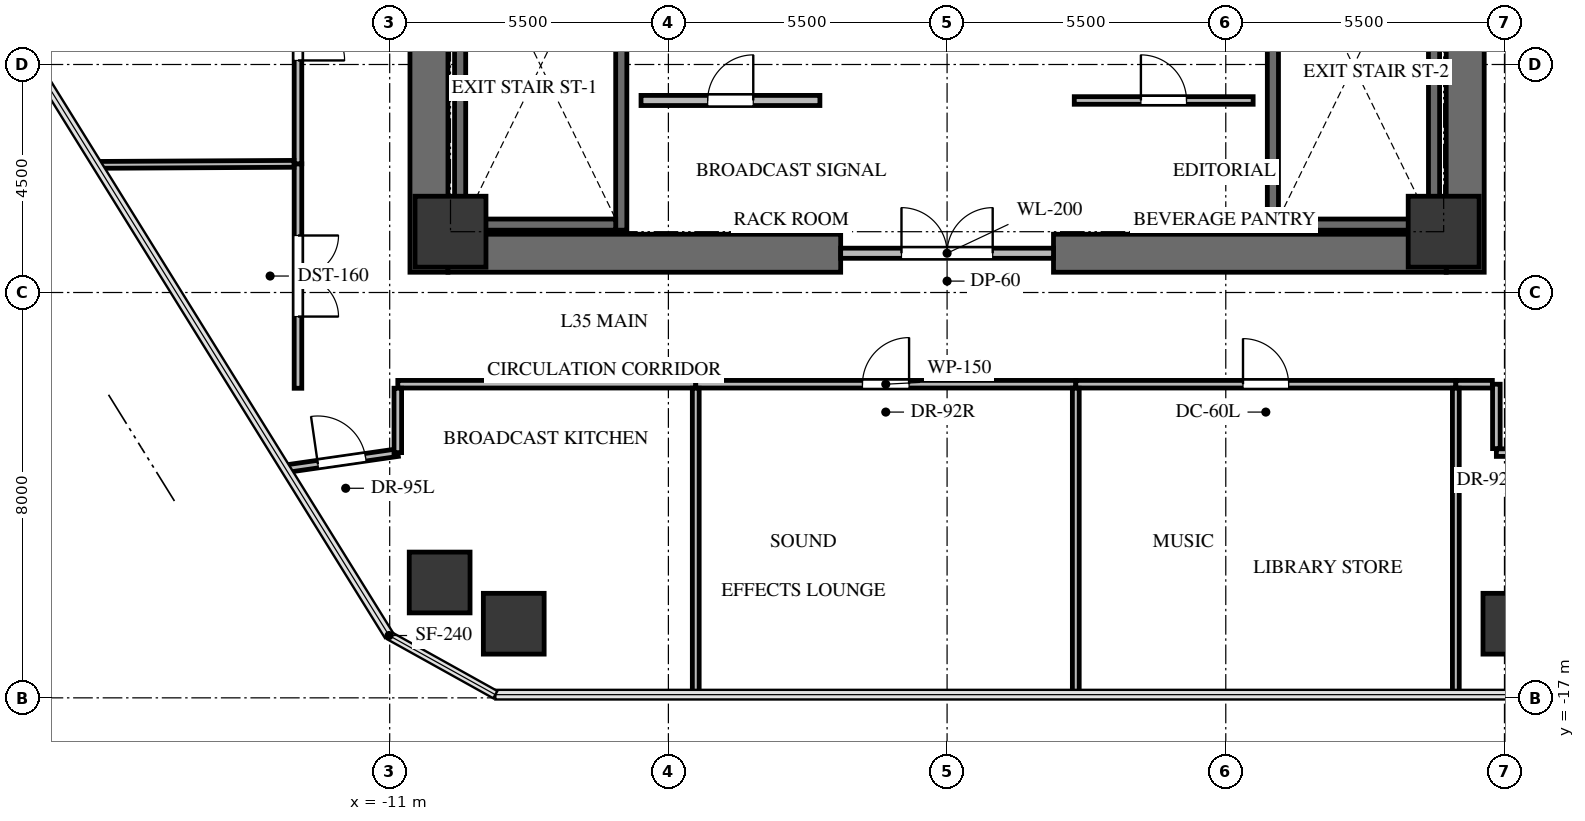
"""IFC4 building model, lengths in metres.
Left out: names, types, materials, properties, quantities, classifications, styles, units other than length and angle.
Written with IfcOpenShell. Run it as: python <this file> out.ifc"""

import sys

from ifc_helpers import new_model, si_unit, direction, frame, frame_2d, origin, origin_2d, place, context, subcontext, project, spatial, rectangle, extrude, source, transform, mapped, element, fill, save


model = new_model("IFC4")
c1 = context("Model", 3, precision=1e-05, world=origin(), true_north=direction((0.0, 1.0)))
c2 = subcontext(c1, "Body", "Model", "MODEL_VIEW")
j1 = project(units=[si_unit("LENGTHUNIT", "METRE"), si_unit("PLANEANGLEUNIT", "RADIAN")], contexts=[c1])
p1 = place(None, origin())
s1 = spatial("IfcSite", under=j1, at=p1, CompositionType="ELEMENT")
p2 = place(p1, origin())
s2 = spatial("IfcBuilding", under=s1, at=p2, CompositionType="ELEMENT")
p3 = place(p2, frame((0.0, 0.0, 130.5)))
s3 = spatial("IfcBuildingStorey", under=s2, at=p3, CompositionType="ELEMENT", Elevation=130.5)
for number, where, z_axis, x_axis in (
    (1, (-10.225, -8.6, 0.0), (0.0, 0.0, 1.0), (0.0, 1.0, 0.0)),
    (2, (10.225, -8.6, 0.0), (0.0, 0.0, 1.0), (0.0, 1.0, 0.0)),
):
    element("IfcWall", number, at=place(p3, frame(where, z_axis=z_axis, x_axis=x_axis)), inside=s3, PredefinedType="SHEAR", context=c2, shape_type="SweptSolid", body=[
        extrude(rectangle(XDim=17.2, YDim=0.75, at=frame_2d((8.6, 0.0))), origin(), (0.0, 0.0, 1.0), 3.3),
    ])
for number, where, z_axis, x_axis in (
    (3, (-9.85, -8.225, 0.0), (0.0, 0.0, 1.0), (1.0, 0.0, 0.0)),
    (4, (2.1, -8.225, 0.0), (0.0, 0.0, 1.0), (1.0, 0.0, 0.0)),
):
    element("IfcWall", number, at=place(p3, frame(where, z_axis=z_axis, x_axis=x_axis)), inside=s3, PredefinedType="SHEAR", context=c2, shape_type="SweptSolid", body=[
        extrude(rectangle(XDim=7.75, YDim=0.75, at=frame_2d((3.875, 0.0))), origin(), (0.0, 0.0, 1.0), 3.3),
    ])
p4 = place(p3, frame((-6.43, -7.77, -0.24), z_axis=(0.0, 0.0, 1.0), x_axis=(0.0, 1.0, 0.0)))
e5 = element("IfcWall", 5, at=p4, inside=s3, PredefinedType="SHEAR", context=c2, shape_type="SweptSolid", body=[
    extrude(rectangle(XDim=7.89, YDim=0.22, at=frame_2d((3.945, 0.0))), origin(), (0.0, 0.0, 1.0), 3.3),
])
p5 = place(p4, frame((6.32, 0.0, 0.0)))
e6 = element("IfcOpeningElement", 6, at=p5, cuts=e5, PredefinedType="OPENING", context=c2, shape_type="SweptSolid", body=[
    extrude(rectangle(XDim=1.05, YDim=2.15, at=frame_2d((0.525, 1.075))), frame((0.0, 0.12, 0.0), z_axis=(0.0, -1.0, 0.0), x_axis=(1.0, 0.0, 0.0)), (0.0, 0.0, 1.0), 0.24),
])
p6 = place(p3, frame((-9.61, 0.12, -0.24), z_axis=(0.0, 0.0, 1.0), x_axis=(0.0, -1.0, 0.0)))
e7 = element("IfcWall", 7, at=p6, inside=s3, PredefinedType="SHEAR", context=c2, shape_type="SweptSolid", body=[
    extrude(rectangle(XDim=7.89, YDim=0.22, at=frame_2d((3.945, 0.0))), origin(), (0.0, 0.0, 1.0), 3.3),
])
p7 = place(p3, frame((-9.5, -7.66, -0.24), z_axis=(0.0, 0.0, 1.0), x_axis=(1.0, 0.0, 0.0)))
e8 = element("IfcWall", 8, at=p7, inside=s3, PredefinedType="SHEAR", context=c2, shape_type="SweptSolid", body=[
    extrude(rectangle(XDim=2.96, YDim=0.22, at=frame_2d((1.48, 0.0))), origin(), (0.0, 0.0, 1.0), 3.3),
])
p8 = place(p3, frame((9.61, -7.77, -0.24), z_axis=(0.0, 0.0, 1.0), x_axis=(0.0, 1.0, 0.0)))
e9 = element("IfcWall", 9, at=p8, inside=s3, PredefinedType="SHEAR", context=c2, shape_type="SweptSolid", body=[
    extrude(rectangle(XDim=7.89, YDim=0.22, at=frame_2d((3.945, 0.0))), origin(), (0.0, 0.0, 1.0), 3.3),
])
p9 = place(p3, frame((6.43, 0.12, -0.24), z_axis=(0.0, 0.0, 1.0), x_axis=(0.0, -1.0, 0.0)))
e10 = element("IfcWall", 10, at=p9, inside=s3, PredefinedType="SHEAR", context=c2, shape_type="SweptSolid", body=[
    extrude(rectangle(XDim=7.89, YDim=0.22, at=frame_2d((3.945, 0.0))), origin(), (0.0, 0.0, 1.0), 3.3),
])
p10 = place(p9, frame((0.52, 0.0, 0.0)))
e11 = element("IfcOpeningElement", 11, at=p10, cuts=e10, PredefinedType="OPENING", context=c2, shape_type="SweptSolid", body=[
    extrude(rectangle(XDim=1.05, YDim=2.15, at=frame_2d((0.525, 1.075))), frame((0.0, 0.12, 0.0), z_axis=(0.0, -1.0, 0.0), x_axis=(1.0, 0.0, 0.0)), (0.0, 0.0, 1.0), 0.24),
])
p11 = place(p3, frame((6.54, -7.66, -0.24), z_axis=(0.0, 0.0, 1.0), x_axis=(1.0, 0.0, 0.0)))
e12 = element("IfcWall", 12, at=p11, inside=s3, PredefinedType="SHEAR", context=c2, shape_type="SweptSolid", body=[
    extrude(rectangle(XDim=2.96, YDim=0.22, at=frame_2d((1.48, 0.0))), origin(), (0.0, 0.0, 1.0), 3.3),
])
m1 = source(origin(), c2, "Body", "SweptSolid", [
    extrude(rectangle(XDim=1.4, YDim=1.4, at=origin_2d()), origin(), (0.0, 0.0, 1.0), 3.3),
])
for number, where, z_axis, x_axis in (
    (13, (-9.8, -7.8, -0.24), (0.0, 0.0, 1.0), (1.0, 0.0, 0.0)),
    (14, (9.8, -7.8, -0.24), (0.0, 0.0, 1.0), (1.0, 0.0, 0.0)),
):
    element("IfcColumn", number, at=place(p3, frame(where, z_axis=z_axis, x_axis=x_axis)), inside=s3, PredefinedType="COLUMN", context=c2, shape_type="MappedRepresentation", body=[
        mapped(m1, transform((0.0, 0.0, 0.0), x_axis=(1.0, 0.0, 0.0), y_axis=(0.0, 1.0, 0.0), z_axis=(0.0, 0.0, 1.0), scale=1.0)),
    ])
m2 = source(origin(), c2, "Body", "SweptSolid", [
    extrude(rectangle(XDim=1.2, YDim=1.2, at=origin_2d()), origin(), (0.0, 0.0, 1.0), 3.3),
])
for number, where, z_axis, x_axis in (
    (15, (-10.014, -14.723, -0.24), (0.0, 0.0, 1.0), (1.0, 0.0, 0.0)),
    (16, (11.176, -15.537, -0.24), (0.0, 0.0, 1.0), (1.0, 0.0, 0.0)),
    (17, (-8.552, -15.537, -0.24), (0.0, 0.0, 1.0), (1.0, 0.0, 0.0)),
):
    element("IfcColumn", number, at=place(p3, frame(where, z_axis=z_axis, x_axis=x_axis)), inside=s3, PredefinedType="COLUMN", context=c2, shape_type="MappedRepresentation", body=[
        mapped(m2, transform((0.0, 0.0, 0.0), x_axis=(1.0, 0.0, 0.0), y_axis=(0.0, 1.0, 0.0), z_axis=(0.0, 0.0, 1.0), scale=1.0)),
    ])
p12 = place(p3, frame((-2.1, -8.225, 0.0), z_axis=(0.0, 0.0, 1.0), x_axis=(1.0, 0.0, 0.0)))
e18 = element("IfcWall", 18, at=p12, inside=s3, PredefinedType="SOLIDWALL", context=c2, shape_type="SweptSolid", body=[
    extrude(rectangle(XDim=4.2, YDim=0.2, at=frame_2d((2.1, 0.0))), origin(), (0.0, 0.0, 1.0), 3.045),
])
p13 = place(p12, frame((1.2, 0.0, 0.0)))
e19 = element("IfcOpeningElement", 19, at=p13, cuts=e18, PredefinedType="OPENING", context=c2, shape_type="SweptSolid", body=[
    extrude(rectangle(XDim=1.8, YDim=2.15, at=frame_2d((0.9, 1.075))), frame((0.0, 0.11, 0.0), z_axis=(0.0, -1.0, 0.0), x_axis=(1.0, 0.0, 0.0)), (0.0, 0.0, 1.0), 0.22),
])
p14 = place(p3, frame((-6.04, -5.21, 0.0), z_axis=(0.0, 0.0, 1.0), x_axis=(1.0, 0.0, 0.0)))
e20 = element("IfcWall", 20, at=p14, inside=s3, PredefinedType="SOLIDWALL", context=c2, shape_type="SweptSolid", body=[
    extrude(rectangle(XDim=3.53, YDim=0.2, at=frame_2d((1.765, 0.0))), origin(), (0.0, 0.0, 1.0), 3.045),
])
p15 = place(p14, frame((1.315, 0.0, 0.0)))
e21 = element("IfcOpeningElement", 21, at=p15, cuts=e20, PredefinedType="OPENING", context=c2, shape_type="SweptSolid", body=[
    extrude(rectangle(XDim=0.9, YDim=2.05, at=frame_2d((0.45, 1.025))), frame((0.0, 0.11, 0.0), z_axis=(0.0, -1.0, 0.0), x_axis=(1.0, 0.0, 0.0)), (0.0, 0.0, 1.0), 0.22),
])
p16 = place(p3, frame((2.51, -5.21, 0.0), z_axis=(0.0, 0.0, 1.0), x_axis=(1.0, 0.0, 0.0)))
e22 = element("IfcWall", 22, at=p16, inside=s3, PredefinedType="PARTITIONING", context=c2, shape_type="SweptSolid", body=[
    extrude(rectangle(XDim=3.53, YDim=0.15, at=frame_2d((1.765, 0.0))), origin(), (0.0, 0.0, 1.0), 3.045),
])
p17 = place(p16, frame((1.315, 0.0, 0.0)))
e23 = element("IfcOpeningElement", 23, at=p17, cuts=e22, PredefinedType="OPENING", context=c2, shape_type="SweptSolid", body=[
    extrude(rectangle(XDim=0.9, YDim=2.05, at=frame_2d((0.45, 1.025))), frame((0.0, 0.085, 0.0), z_axis=(0.0, -1.0, 0.0), x_axis=(1.0, 0.0, 0.0)), (0.0, 0.0, 1.0), 0.17),
])
p18 = place(p3, frame((-10.84, -10.81, 0.0), z_axis=(0.0, 0.0, 1.0), x_axis=(1.0, 0.0, 0.0)))
e24 = element("IfcWall", 24, at=p18, inside=s3, PredefinedType="PARTITIONING", context=c2, shape_type="SweptSolid", body=[
    extrude(rectangle(XDim=5.88, YDim=0.15, at=frame_2d((2.94, 0.0))), origin(), (0.0, 0.0, 1.0), 2.212),
])
p19 = place(p3, frame((-13.054, -12.479, 0.0), z_axis=(0.0, 0.0, 1.0), x_axis=(0.989787303338, 0.142552075227, 0.0)))
e25 = element("IfcWall", 25, at=p19, inside=s3, PredefinedType="PARTITIONING", context=c2, shape_type="SweptSolid", body=[
    extrude(rectangle(XDim=2.237, YDim=0.15, at=frame_2d((1.118, 0.0))), origin(), (0.0, 0.0, 1.0), 2.38),
])
p20 = place(p19, frame((0.643, 0.0, 0.0)))
e26 = element("IfcOpeningElement", 26, at=p20, cuts=e25, PredefinedType="OPENING", context=c2, shape_type="SweptSolid", body=[
    extrude(rectangle(XDim=0.95, YDim=2.1, at=frame_2d((0.475, 1.05))), frame((0.0, 0.085, 0.0), z_axis=(0.0, -1.0, 0.0), x_axis=(1.0, 0.0, 0.0)), (0.0, 0.0, 1.0), 0.17),
])
p21 = place(p3, frame((-10.84, -12.16, 0.0), z_axis=(0.0, 0.0, 1.0), x_axis=(0.0, 1.0, 0.0)))
e27 = element("IfcWall", 27, at=p21, inside=s3, PredefinedType="PARTITIONING", context=c2, shape_type="SweptSolid", body=[
    extrude(rectangle(XDim=1.271, YDim=0.15, at=frame_2d((0.635, 0.0))), origin(), (0.0, 0.0, 1.0), 3.045),
])
p22 = place(p3, frame((-4.96, -10.81, 0.0), z_axis=(0.0, 0.0, 1.0), x_axis=(1.0, 0.0, 0.0)))
e28 = element("IfcWall", 28, at=p22, inside=s3, PredefinedType="PARTITIONING", context=c2, shape_type="SweptSolid", body=[
    extrude(rectangle(XDim=7.5, YDim=0.15, at=frame_2d((3.75, 0.0))), origin(), (0.0, 0.0, 1.0), 2.212),
])
p23 = place(p22, frame((3.29, 0.0, 0.0)))
e29 = element("IfcOpeningElement", 29, at=p23, cuts=e28, PredefinedType="OPENING", context=c2, shape_type="SweptSolid", body=[
    extrude(rectangle(XDim=0.92, YDim=2.1, at=frame_2d((0.46, 1.05))), frame((0.0, 0.085, 0.0), z_axis=(0.0, -1.0, 0.0), x_axis=(1.0, 0.0, 0.0)), (0.0, 0.0, 1.0), 0.17),
])
p24 = place(p3, frame((2.54, -10.81, 0.0), z_axis=(0.0, 0.0, 1.0), x_axis=(1.0, 0.0, 0.0)))
e30 = element("IfcWall", 30, at=p24, inside=s3, PredefinedType="PARTITIONING", context=c2, shape_type="SweptSolid", body=[
    extrude(rectangle(XDim=7.5, YDim=0.15, at=frame_2d((3.75, 0.0))), origin(), (0.0, 0.0, 1.0), 2.212),
])
p25 = place(p24, frame((3.3, 0.0, 0.0)))
e31 = element("IfcOpeningElement", 31, at=p25, cuts=e30, PredefinedType="OPENING", context=c2, shape_type="SweptSolid", body=[
    extrude(rectangle(XDim=0.9, YDim=2.05, at=frame_2d((0.45, 1.025))), frame((0.0, 0.085, 0.0), z_axis=(0.0, -1.0, 0.0), x_axis=(1.0, 0.0, 0.0)), (0.0, 0.0, 1.0), 0.17),
])
p26 = place(p3, frame((10.84, -12.16, 0.0), z_axis=(0.0, 0.0, 1.0), x_axis=(1.0, 0.0, 0.0)))
e32 = element("IfcWall", 32, at=p26, inside=s3, PredefinedType="PARTITIONING", context=c2, shape_type="SweptSolid", body=[
    extrude(rectangle(XDim=1.97, YDim=0.15, at=frame_2d((0.985, 0.0))), origin(), (0.0, 0.0, 1.0), 3.045),
])
p27 = place(p26, frame((0.525, 0.0, 0.0)))
e33 = element("IfcOpeningElement", 33, at=p27, cuts=e32, PredefinedType="OPENING", context=c2, shape_type="SweptSolid", body=[
    extrude(rectangle(XDim=0.92, YDim=2.1, at=frame_2d((0.46, 1.05))), frame((0.0, 0.085, 0.0), z_axis=(0.0, -1.0, 0.0), x_axis=(1.0, 0.0, 0.0)), (0.0, 0.0, 1.0), 0.17),
])
p28 = place(p3, frame((10.84, -10.81, 0.0), z_axis=(0.0, 0.0, 1.0), x_axis=(0.0, -1.0, 0.0)))
e34 = element("IfcWall", 34, at=p28, inside=s3, PredefinedType="PARTITIONING", context=c2, shape_type="SweptSolid", body=[
    extrude(rectangle(XDim=1.271, YDim=0.15, at=frame_2d((0.635, 0.0))), origin(), (0.0, 0.0, 1.0), 3.045),
])
p29 = place(p3, frame((10.04, -10.81, 0.0), z_axis=(0.0, 0.0, 1.0), x_axis=(1.0, 0.0, 0.0)))
e35 = element("IfcWall", 35, at=p29, inside=s3, PredefinedType="PARTITIONING", context=c2, shape_type="SweptSolid", body=[
    extrude(rectangle(XDim=0.721, YDim=0.15, at=frame_2d((0.36, 0.0))), origin(), (0.0, 0.0, 1.0), 3.045),
])
p30 = place(p3, frame((-12.81, -6.46, 0.0), z_axis=(0.0, 0.0, 1.0), x_axis=(0.0, -1.0, 0.0)))
e36 = element("IfcWall", 36, at=p30, inside=s3, PredefinedType="PARTITIONING", context=c2, shape_type="SweptSolid", body=[
    extrude(rectangle(XDim=4.43, YDim=0.15, at=frame_2d((2.215, 0.0))), origin(), (0.0, 0.0, 1.0), 2.38),
])
p31 = place(p30, frame((1.415, 0.0, 0.0)))
e37 = element("IfcOpeningElement", 37, at=p31, cuts=e36, PredefinedType="OPENING", context=c2, shape_type="SweptSolid", body=[
    extrude(rectangle(XDim=1.6, YDim=2.15, at=frame_2d((0.8, 1.075))), frame((0.0, 0.085, 0.0), z_axis=(0.0, -1.0, 0.0), x_axis=(1.0, 0.0, 0.0)), (0.0, 0.0, 1.0), 0.17),
])
p32 = place(p3, frame((-12.81, -1.46, 0.0), z_axis=(0.0, 0.0, 1.0), x_axis=(0.0, -1.0, 0.0)))
e38 = element("IfcWall", 38, at=p32, inside=s3, PredefinedType="PARTITIONING", context=c2, shape_type="SweptSolid", body=[
    extrude(rectangle(XDim=5.0, YDim=0.15, at=frame_2d((2.5, 0.0))), origin(), (0.0, 0.0, 1.0), 3.045),
])
p33 = place(p32, frame((2.04, 0.0, 0.0)))
e39 = element("IfcOpeningElement", 39, at=p33, cuts=e38, PredefinedType="OPENING", context=c2, shape_type="SweptSolid", body=[
    extrude(rectangle(XDim=0.92, YDim=2.1, at=frame_2d((0.46, 1.05))), frame((0.0, 0.085, 0.0), z_axis=(0.0, -1.0, 0.0), x_axis=(1.0, 0.0, 0.0)), (0.0, 0.0, 1.0), 0.17),
])
p34 = place(p3, frame((-4.96, -10.889, 0.0), z_axis=(0.0, 0.0, 1.0), x_axis=(0.0, -1.0, 0.0)))
e40 = element("IfcWall", 40, at=p34, inside=s3, PredefinedType="PARTITIONING", context=c2, shape_type="SweptSolid", body=[
    extrude(rectangle(XDim=6.048, YDim=0.135, at=frame_2d((3.024, 0.0))), origin(), (0.0, 0.0, 1.0), 2.212),
])
p35 = place(p3, frame((2.54, -10.889, 0.0), z_axis=(0.0, 0.0, 1.0), x_axis=(0.0, -1.0, 0.0)))
e41 = element("IfcWall", 41, at=p35, inside=s3, PredefinedType="PARTITIONING", context=c2, shape_type="SweptSolid", body=[
    extrude(rectangle(XDim=6.048, YDim=0.135, at=frame_2d((3.024, 0.0))), origin(), (0.0, 0.0, 1.0), 2.38),
])
p36 = place(p3, frame((10.04, -10.889, 0.0), z_axis=(0.0, 0.0, 1.0), x_axis=(0.0, -1.0, 0.0)))
e42 = element("IfcWall", 42, at=p36, inside=s3, PredefinedType="PARTITIONING", context=c2, shape_type="SweptSolid", body=[
    extrude(rectangle(XDim=6.048, YDim=0.135, at=frame_2d((3.024, 0.0))), origin(), (0.0, 0.0, 1.0), 2.212),
])
p37 = place(p3, frame((-16.774, -6.481, 0.0), z_axis=(0.0, 0.0, 1.0), x_axis=(0.999985736048, 0.005341132812, 0.0)))
e43 = element("IfcWall", 43, at=p37, inside=s3, PredefinedType="PARTITIONING", context=c2, shape_type="SweptSolid", body=[
    extrude(rectangle(XDim=3.885, YDim=0.135, at=frame_2d((1.943, 0.0))), origin(), (0.0, 0.0, 1.0), 2.38),
])
m3 = source(origin(), c2, "Body", "SweptSolid", [
    extrude(rectangle(XDim=1.8, YDim=2.15, at=frame_2d((0.9, 1.075))), frame((0.0, 0.025, 0.0), z_axis=(0.0, -1.0, 0.0), x_axis=(1.0, 0.0, 0.0)), (0.0, 0.0, 1.0), 0.05),
])
p38 = place(p13, origin())
e44 = element("IfcDoor", 44, at=p38, inside=s3, OperationType="DOUBLE_DOOR_SINGLE_SWING", PredefinedType="DOOR", context=c2, shape_type="MappedRepresentation", body=[
    mapped(m3, transform((0.0, 0.0, 0.0), x_axis=(1.0, 0.0, 0.0), y_axis=(0.0, 1.0, 0.0), z_axis=(0.0, 0.0, 1.0), scale=1.0)),
])
fill(e19, e44)
m4 = source(origin(), c2, "Body", "SweptSolid", [
    extrude(rectangle(XDim=0.9, YDim=2.05, at=frame_2d((0.45, 1.025))), frame((0.0, 0.025, 0.0), z_axis=(0.0, -1.0, 0.0), x_axis=(1.0, 0.0, 0.0)), (0.0, 0.0, 1.0), 0.05),
])
p39 = place(p15, origin())
e45 = element("IfcDoor", 45, at=p39, inside=s3, OperationType="SINGLE_SWING_RIGHT", PredefinedType="DOOR", context=c2, shape_type="MappedRepresentation", body=[
    mapped(m4, transform((0.0, 0.0, 0.0), x_axis=(1.0, 0.0, 0.0), y_axis=(0.0, 1.0, 0.0), z_axis=(0.0, 0.0, 1.0), scale=1.0)),
])
fill(e21, e45)
m5 = source(origin(), c2, "Body", "SweptSolid", [
    extrude(rectangle(XDim=0.9, YDim=2.05, at=frame_2d((0.45, 1.025))), frame((0.0, 0.025, 0.0), z_axis=(0.0, -1.0, 0.0), x_axis=(1.0, 0.0, 0.0)), (0.0, 0.0, 1.0), 0.05),
])
p40 = place(p17, origin())
e46 = element("IfcDoor", 46, at=p40, inside=s3, OperationType="SINGLE_SWING_LEFT", PredefinedType="DOOR", context=c2, shape_type="MappedRepresentation", body=[
    mapped(m5, transform((0.0, 0.0, 0.0), x_axis=(1.0, 0.0, 0.0), y_axis=(0.0, 1.0, 0.0), z_axis=(0.0, 0.0, 1.0), scale=1.0)),
])
fill(e23, e46)
m6 = source(origin(), c2, "Body", "SweptSolid", [
    extrude(rectangle(XDim=0.95, YDim=2.1, at=frame_2d((0.475, 1.05))), frame((0.0, 0.025, 0.0), z_axis=(0.0, -1.0, 0.0), x_axis=(1.0, 0.0, 0.0)), (0.0, 0.0, 1.0), 0.05),
])
p41 = place(p20, origin())
e47 = element("IfcDoor", 47, at=p41, inside=s3, OperationType="SINGLE_SWING_LEFT", PredefinedType="DOOR", context=c2, shape_type="MappedRepresentation", body=[
    mapped(m6, transform((0.0, 0.0, 0.0), x_axis=(1.0, 0.0, 0.0), y_axis=(0.0, 1.0, 0.0), z_axis=(0.0, 0.0, 1.0), scale=1.0)),
])
fill(e26, e47)
m7 = source(origin(), c2, "Body", "SweptSolid", [
    extrude(rectangle(XDim=0.92, YDim=2.1, at=frame_2d((0.46, 1.05))), frame((0.0, 0.025, 0.0), z_axis=(0.0, -1.0, 0.0), x_axis=(1.0, 0.0, 0.0)), (0.0, 0.0, 1.0), 0.05),
])
p42 = place(p23, origin())
e48 = element("IfcDoor", 48, at=p42, inside=s3, OperationType="SINGLE_SWING_RIGHT", PredefinedType="DOOR", context=c2, shape_type="MappedRepresentation", body=[
    mapped(m7, transform((0.0, 0.0, 0.0), x_axis=(1.0, 0.0, 0.0), y_axis=(0.0, 1.0, 0.0), z_axis=(0.0, 0.0, 1.0), scale=1.0)),
])
fill(e29, e48)
p43 = place(p25, origin())
e49 = element("IfcDoor", 49, at=p43, inside=s3, OperationType="SINGLE_SWING_LEFT", PredefinedType="DOOR", context=c2, shape_type="MappedRepresentation", body=[
    mapped(m5, transform((0.0, 0.0, 0.0), x_axis=(1.0, 0.0, 0.0), y_axis=(0.0, 1.0, 0.0), z_axis=(0.0, 0.0, 1.0), scale=1.0)),
])
fill(e31, e49)
m8 = source(origin(), c2, "Body", "SweptSolid", [
    extrude(rectangle(XDim=1.6, YDim=2.15, at=frame_2d((0.8, 1.075))), frame((0.0, 0.025, 0.0), z_axis=(0.0, -1.0, 0.0), x_axis=(1.0, 0.0, 0.0)), (0.0, 0.0, 1.0), 0.05),
])
p44 = place(p31, origin())
e50 = element("IfcDoor", 50, at=p44, inside=s3, OperationType="DOUBLE_DOOR_SINGLE_SWING", PredefinedType="DOOR", context=c2, shape_type="MappedRepresentation", body=[
    mapped(m8, transform((0.0, 0.0, 0.0), x_axis=(1.0, 0.0, 0.0), y_axis=(0.0, 1.0, 0.0), z_axis=(0.0, 0.0, 1.0), scale=1.0)),
])
fill(e37, e50)
p45 = place(p33, origin())
e51 = element("IfcDoor", 51, at=p45, inside=s3, OperationType="SINGLE_SWING_RIGHT", PredefinedType="DOOR", context=c2, shape_type="MappedRepresentation", body=[
    mapped(m7, transform((0.0, 0.0, 0.0), x_axis=(1.0, 0.0, 0.0), y_axis=(0.0, 1.0, 0.0), z_axis=(0.0, 0.0, 1.0), scale=1.0)),
])
fill(e39, e51)
save(model, sys.argv[1])
